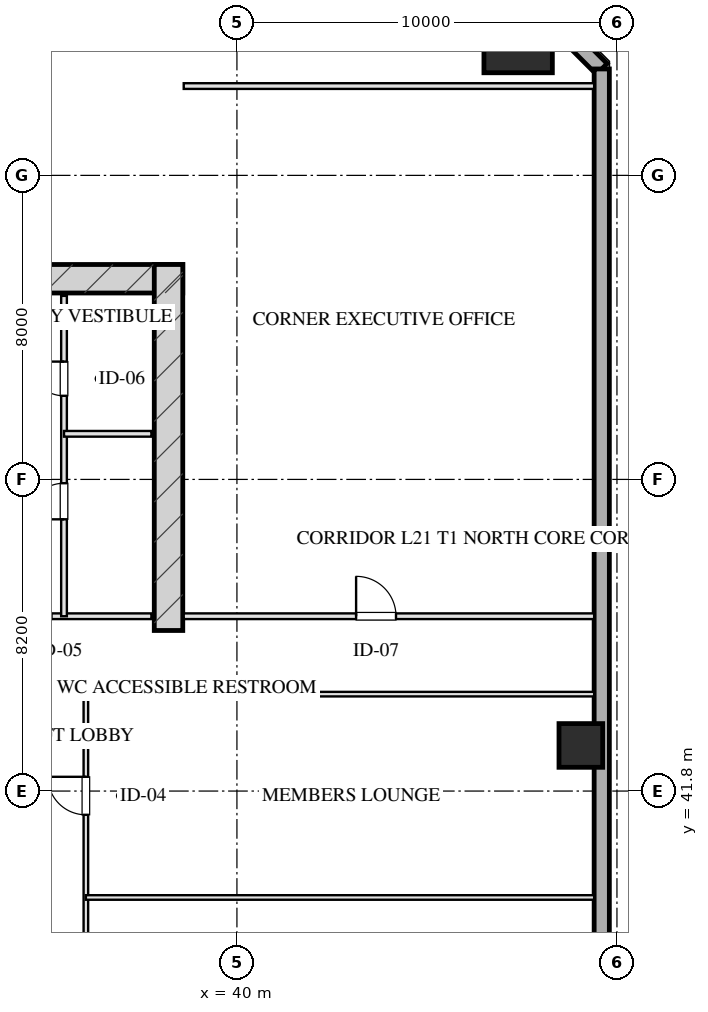
"""IFC4 building model, lengths in metres.
Left out: names, types, materials, properties, quantities, classifications, styles, units other than length and angle.
Written with IfcOpenShell. Run it as: python <this file> out.ifc"""

import sys

from ifc_helpers import new_model, si_unit, direction, frame, frame_2d, origin, origin_2d, place, context, subcontext, project, spatial, rectangle, hollow_rectangle, extrude, element, fill, save


model = new_model("IFC4")
c1 = context("Model", 3, precision=1e-05, world=origin(), true_north=direction((0.0, 1.0)))
c2 = subcontext(c1, "Body", "Model", "MODEL_VIEW")
j1 = project(units=[si_unit("LENGTHUNIT", "METRE"), si_unit("PLANEANGLEUNIT", "RADIAN")], contexts=[c1])
p1 = place(None, origin())
s1 = spatial("IfcSite", under=j1, at=p1, CompositionType="ELEMENT")
p2 = place(p1, origin())
s2 = spatial("IfcBuilding", under=s1, at=p2, CompositionType="ELEMENT")
p3 = place(p2, frame((0.0, 0.0, 85.1)))
s3 = spatial("IfcBuildingStorey", under=s2, at=p3, CompositionType="ELEMENT", Elevation=85.1)
p4 = place(p3, frame((21.425, 55.28, 0.0), z_axis=(0.0, 0.0, 1.0), x_axis=(1.0, 0.0, 0.0)))
e1 = element("IfcWall", 1, at=p4, inside=s3, PredefinedType="SHEAR", context=c2, shape_type="SweptSolid", body=[
    extrude(rectangle(XDim=17.15, YDim=0.75, at=frame_2d((8.575, 0.0))), origin(), (0.0, 0.0, 1.0), 3.45),
])
p5 = place(p3, frame((38.2, 46.025, 0.0), z_axis=(0.0, 0.0, 1.0), x_axis=(0.0, 1.0, 0.0)))
e2 = element("IfcWall", 2, at=p5, inside=s3, PredefinedType="SHEAR", context=c2, shape_type="SweptSolid", body=[
    extrude(rectangle(XDim=9.63, YDim=0.75, at=frame_2d((4.815, 0.0))), origin(), (0.0, 0.0, 1.0), 3.45),
])
p6 = place(p3, frame((47.4, 61.6, 0.0), z_axis=(0.0, 0.0, 1.0), x_axis=(1.0, 0.0, 0.0)))
e3 = element("IfcColumn", 3, at=p6, inside=s3, PredefinedType="COLUMN", context=c2, shape_type="SweptSolid", body=[
    extrude(hollow_rectangle(XDim=1.8, YDim=1.8, WallThickness=0.06, at=origin_2d()), origin(), (0.0, 0.0, 1.0), 3.451),
])
p7 = place(p3, frame((49.05, 43.0, 0.0), z_axis=(0.0, 0.0, 1.0), x_axis=(1.0, 0.0, 0.0)))
e4 = element("IfcColumn", 4, at=p7, inside=s3, PredefinedType="COLUMN", context=c2, shape_type="SweptSolid", body=[
    extrude(hollow_rectangle(XDim=1.15, YDim=1.15, WallThickness=0.04, at=origin_2d()), origin(), (0.0, 0.0, 1.0), 3.451),
])
p8 = place(p3, frame((46.6, 63.8, 0.0), z_axis=(0.0, 0.0, 1.0), x_axis=(0.707106781187, -0.707106781187, 0.0)))
e5 = element("IfcWall", 5, at=p8, inside=s3, PredefinedType="SOLIDWALL", context=c2, shape_type="SweptSolid", body=[
    extrude(rectangle(XDim=4.243, YDim=0.4, at=frame_2d((2.121, 0.0))), origin(), (0.0, 0.0, 1.0), 2.61),
])
p9 = place(p3, frame((49.6, 60.8, 0.0), z_axis=(0.0, 0.0, 1.0), x_axis=(0.0, -1.0, 0.0)))
e6 = element("IfcWall", 6, at=p9, inside=s3, PredefinedType="SOLIDWALL", context=c2, shape_type="SweptSolid", body=[
    extrude(rectangle(XDim=53.6, YDim=0.4, at=frame_2d((26.8, 0.0))), origin(), (0.0, 0.0, 1.0), 2.61),
])
p10 = place(p9, frame((32.0, 0.0, 0.75)))
e7 = element("IfcOpeningElement", 7, at=p10, cuts=e6, PredefinedType="OPENING", context=c2, shape_type="SweptSolid", body=[
    extrude(rectangle(XDim=2.4, YDim=1.46, at=frame_2d((1.2, 0.73))), frame((0.0, 0.21, 0.0), z_axis=(0.0, -1.0, 0.0), x_axis=(1.0, 0.0, 0.0)), (0.0, 0.0, 1.0), 0.42),
])
p11 = place(p9, frame((23.0, 0.0, 0.75)))
e8 = element("IfcOpeningElement", 8, at=p11, cuts=e6, PredefinedType="OPENING", context=c2, shape_type="SweptSolid", body=[
    extrude(rectangle(XDim=2.4, YDim=1.46, at=frame_2d((1.2, 0.73))), frame((0.0, 0.21, 0.0), z_axis=(0.0, -1.0, 0.0), x_axis=(1.0, 0.0, 0.0)), (0.0, 0.0, 1.0), 0.42),
])
p12 = place(p3, frame((33.95, 46.4, 0.0), z_axis=(0.0, 0.0, 1.0), x_axis=(1.0, 0.0, 0.0)))
e9 = element("IfcWall", 9, at=p12, inside=s3, PredefinedType="PARTITIONING", context=c2, shape_type="SweptSolid", body=[
    extrude(rectangle(XDim=3.8, YDim=0.15, at=frame_2d((1.9, 0.0))), origin(), (0.0, 0.0, 1.0), 3.175),
])
p13 = place(p12, frame((0.22, 0.0, 0.0)))
e10 = element("IfcOpeningElement", 10, at=p13, cuts=e9, PredefinedType="OPENING", context=c2, shape_type="SweptSolid", body=[
    extrude(rectangle(XDim=0.95, YDim=2.05, at=frame_2d((0.475, 1.025))), frame((0.0, 0.085, 0.0), z_axis=(0.0, -1.0, 0.0), x_axis=(1.0, 0.0, 0.0)), (0.0, 0.0, 1.0), 0.17),
])
p14 = place(p3, frame((35.45, 46.4, 0.0), z_axis=(0.0, 0.0, 1.0), x_axis=(0.0, 1.0, 0.0)))
e11 = element("IfcWall", 11, at=p14, inside=s3, PredefinedType="PARTITIONING", context=c2, shape_type="SweptSolid", body=[
    extrude(rectangle(XDim=8.43, YDim=0.15, at=frame_2d((4.215, 0.0))), origin(), (0.0, 0.0, 1.0), 2.815),
])
p15 = place(p14, frame((2.55, 0.0, 0.0)))
e12 = element("IfcOpeningElement", 12, at=p15, cuts=e11, PredefinedType="OPENING", context=c2, shape_type="SweptSolid", body=[
    extrude(rectangle(XDim=0.95, YDim=2.05, at=frame_2d((0.475, 1.025))), frame((0.0, 0.085, 0.0), z_axis=(0.0, -1.0, 0.0), x_axis=(1.0, 0.0, 0.0)), (0.0, 0.0, 1.0), 0.17),
])
p16 = place(p14, frame((5.8, 0.0, 0.0)))
e13 = element("IfcOpeningElement", 13, at=p16, cuts=e11, PredefinedType="OPENING", context=c2, shape_type="SweptSolid", body=[
    extrude(rectangle(XDim=0.9, YDim=2.05, at=frame_2d((0.45, 1.025))), frame((0.0, 0.085, 0.0), z_axis=(0.0, -1.0, 0.0), x_axis=(1.0, 0.0, 0.0)), (0.0, 0.0, 1.0), 0.17),
])
p17 = place(p3, frame((35.45, 51.2, 0.0), z_axis=(0.0, 0.0, 1.0), x_axis=(1.0, 0.0, 0.0)))
e14 = element("IfcWall", 14, at=p17, inside=s3, PredefinedType="PARTITIONING", context=c2, shape_type="SweptSolid", body=[
    extrude(rectangle(XDim=2.3, YDim=0.15, at=frame_2d((1.15, 0.0))), origin(), (0.0, 0.0, 1.0), 3.175),
])
p18 = place(p3, frame((38.6, 60.35, 0.0), z_axis=(0.0, 0.0, 1.0), x_axis=(1.0, 0.0, 0.0)))
e15 = element("IfcWall", 15, at=p18, inside=s3, PredefinedType="PARTITIONING", context=c2, shape_type="SweptSolid", body=[
    extrude(rectangle(XDim=10.8, YDim=0.15, at=frame_2d((5.4, 0.0))), origin(), (0.0, 0.0, 1.0), 3.175),
])
p19 = place(p3, frame((38.6, 46.4, 0.0), z_axis=(0.0, 0.0, 1.0), x_axis=(1.0, 0.0, 0.0)))
e16 = element("IfcWall", 16, at=p19, inside=s3, PredefinedType="PARTITIONING", context=c2, shape_type="SweptSolid", body=[
    extrude(rectangle(XDim=10.8, YDim=0.15, at=frame_2d((5.4, 0.0))), origin(), (0.0, 0.0, 1.0), 3.175),
])
p20 = place(p19, frame((4.536, 0.0, 0.0)))
e17 = element("IfcOpeningElement", 17, at=p20, cuts=e16, PredefinedType="OPENING", context=c2, shape_type="SweptSolid", body=[
    extrude(rectangle(XDim=1.05, YDim=2.05, at=frame_2d((0.525, 1.025))), frame((0.0, 0.085, 0.0), z_axis=(0.0, -1.0, 0.0), x_axis=(1.0, 0.0, 0.0)), (0.0, 0.0, 1.0), 0.17),
])
p21 = place(p3, frame((36.025, 44.35, 0.0), z_axis=(0.0, 0.0, 1.0), x_axis=(1.0, 0.0, 0.0)))
e18 = element("IfcWall", 18, at=p21, inside=s3, PredefinedType="PARTITIONING", context=c2, shape_type="SweptSolid", body=[
    extrude(rectangle(XDim=13.375, YDim=0.12, at=frame_2d((6.688, 0.0))), origin(), (0.0, 0.0, 1.0), 3.175),
])
p22 = place(p3, frame((36.025, 23.65, 0.0), z_axis=(0.0, 0.0, 1.0), x_axis=(0.0, 1.0, 0.0)))
e19 = element("IfcWall", 19, at=p22, inside=s3, PredefinedType="PARTITIONING", context=c2, shape_type="SweptSolid", body=[
    extrude(rectangle(XDim=20.7, YDim=0.12, at=frame_2d((10.35, 0.0))), origin(), (0.0, 0.0, 1.0), 3.175),
])
p23 = place(p22, frame((4.075, 0.0, 0.0)))
e20 = element("IfcOpeningElement", 20, at=p23, cuts=e19, PredefinedType="OPENING", context=c2, shape_type="SweptSolid", body=[
    extrude(rectangle(XDim=1.0, YDim=2.05, at=frame_2d((0.5, 1.025))), frame((0.0, 0.07, 0.0), z_axis=(0.0, -1.0, 0.0), x_axis=(1.0, 0.0, 0.0)), (0.0, 0.0, 1.0), 0.14),
])
p24 = place(p22, frame((11.75, 0.0, 0.0)))
e21 = element("IfcOpeningElement", 21, at=p24, cuts=e19, PredefinedType="OPENING", context=c2, shape_type="SweptSolid", body=[
    extrude(rectangle(XDim=1.05, YDim=2.05, at=frame_2d((0.525, 1.025))), frame((0.0, 0.07, 0.0), z_axis=(0.0, -1.0, 0.0), x_axis=(1.0, 0.0, 0.0)), (0.0, 0.0, 1.0), 0.14),
])
p25 = place(p22, frame((17.525, 0.0, 0.0)))
e22 = element("IfcOpeningElement", 22, at=p25, cuts=e19, PredefinedType="OPENING", context=c2, shape_type="SweptSolid", body=[
    extrude(rectangle(XDim=1.0, YDim=2.05, at=frame_2d((0.5, 1.025))), frame((0.0, 0.07, 0.0), z_axis=(0.0, -1.0, 0.0), x_axis=(1.0, 0.0, 0.0)), (0.0, 0.0, 1.0), 0.14),
])
p26 = place(p3, frame((36.025, 39.0, 0.0), z_axis=(0.0, 0.0, 1.0), x_axis=(1.0, 0.0, 0.0)))
e23 = element("IfcWall", 23, at=p26, inside=s3, PredefinedType="PARTITIONING", context=c2, shape_type="SweptSolid", body=[
    extrude(rectangle(XDim=13.375, YDim=0.12, at=frame_2d((6.688, 0.0))), origin(), (0.0, 0.0, 1.0), 3.175),
])
p27 = place(p15, origin())
e24 = element("IfcDoor", 24, at=p27, inside=s3, OperationType="SINGLE_SWING_LEFT", PredefinedType="DOOR", context=c2, shape_type="SweptSolid", body=[
    extrude(rectangle(XDim=0.95, YDim=2.05, at=frame_2d((0.475, 1.025))), frame((0.0, 0.025, 0.0), z_axis=(0.0, -1.0, 0.0), x_axis=(1.0, 0.0, 0.0)), (0.0, 0.0, 1.0), 0.05),
])
fill(e12, e24)
p28 = place(p16, origin())
e25 = element("IfcDoor", 25, at=p28, inside=s3, OperationType="SINGLE_SWING_RIGHT", PredefinedType="DOOR", context=c2, shape_type="SweptSolid", body=[
    extrude(rectangle(XDim=0.9, YDim=2.05, at=frame_2d((0.45, 1.025))), frame((0.0, 0.025, 0.0), z_axis=(0.0, -1.0, 0.0), x_axis=(1.0, 0.0, 0.0)), (0.0, 0.0, 1.0), 0.05),
])
fill(e13, e25)
p29 = place(p20, origin())
e26 = element("IfcDoor", 26, at=p29, inside=s3, OperationType="SINGLE_SWING_LEFT", PredefinedType="DOOR", context=c2, shape_type="SweptSolid", body=[
    extrude(rectangle(XDim=1.05, YDim=2.05, at=frame_2d((0.525, 1.025))), frame((0.0, 0.025, 0.0), z_axis=(0.0, -1.0, 0.0), x_axis=(1.0, 0.0, 0.0)), (0.0, 0.0, 1.0), 0.05),
])
fill(e17, e26)
p30 = place(p25, origin())
e27 = element("IfcDoor", 27, at=p30, inside=s3, OperationType="SINGLE_SWING_RIGHT", PredefinedType="DOOR", context=c2, shape_type="SweptSolid", body=[
    extrude(rectangle(XDim=1.0, YDim=2.05, at=frame_2d((0.5, 1.025))), frame((0.0, 0.025, 0.0), z_axis=(0.0, -1.0, 0.0), x_axis=(1.0, 0.0, 0.0)), (0.0, 0.0, 1.0), 0.05),
])
fill(e22, e27)
save(model, sys.argv[1])
